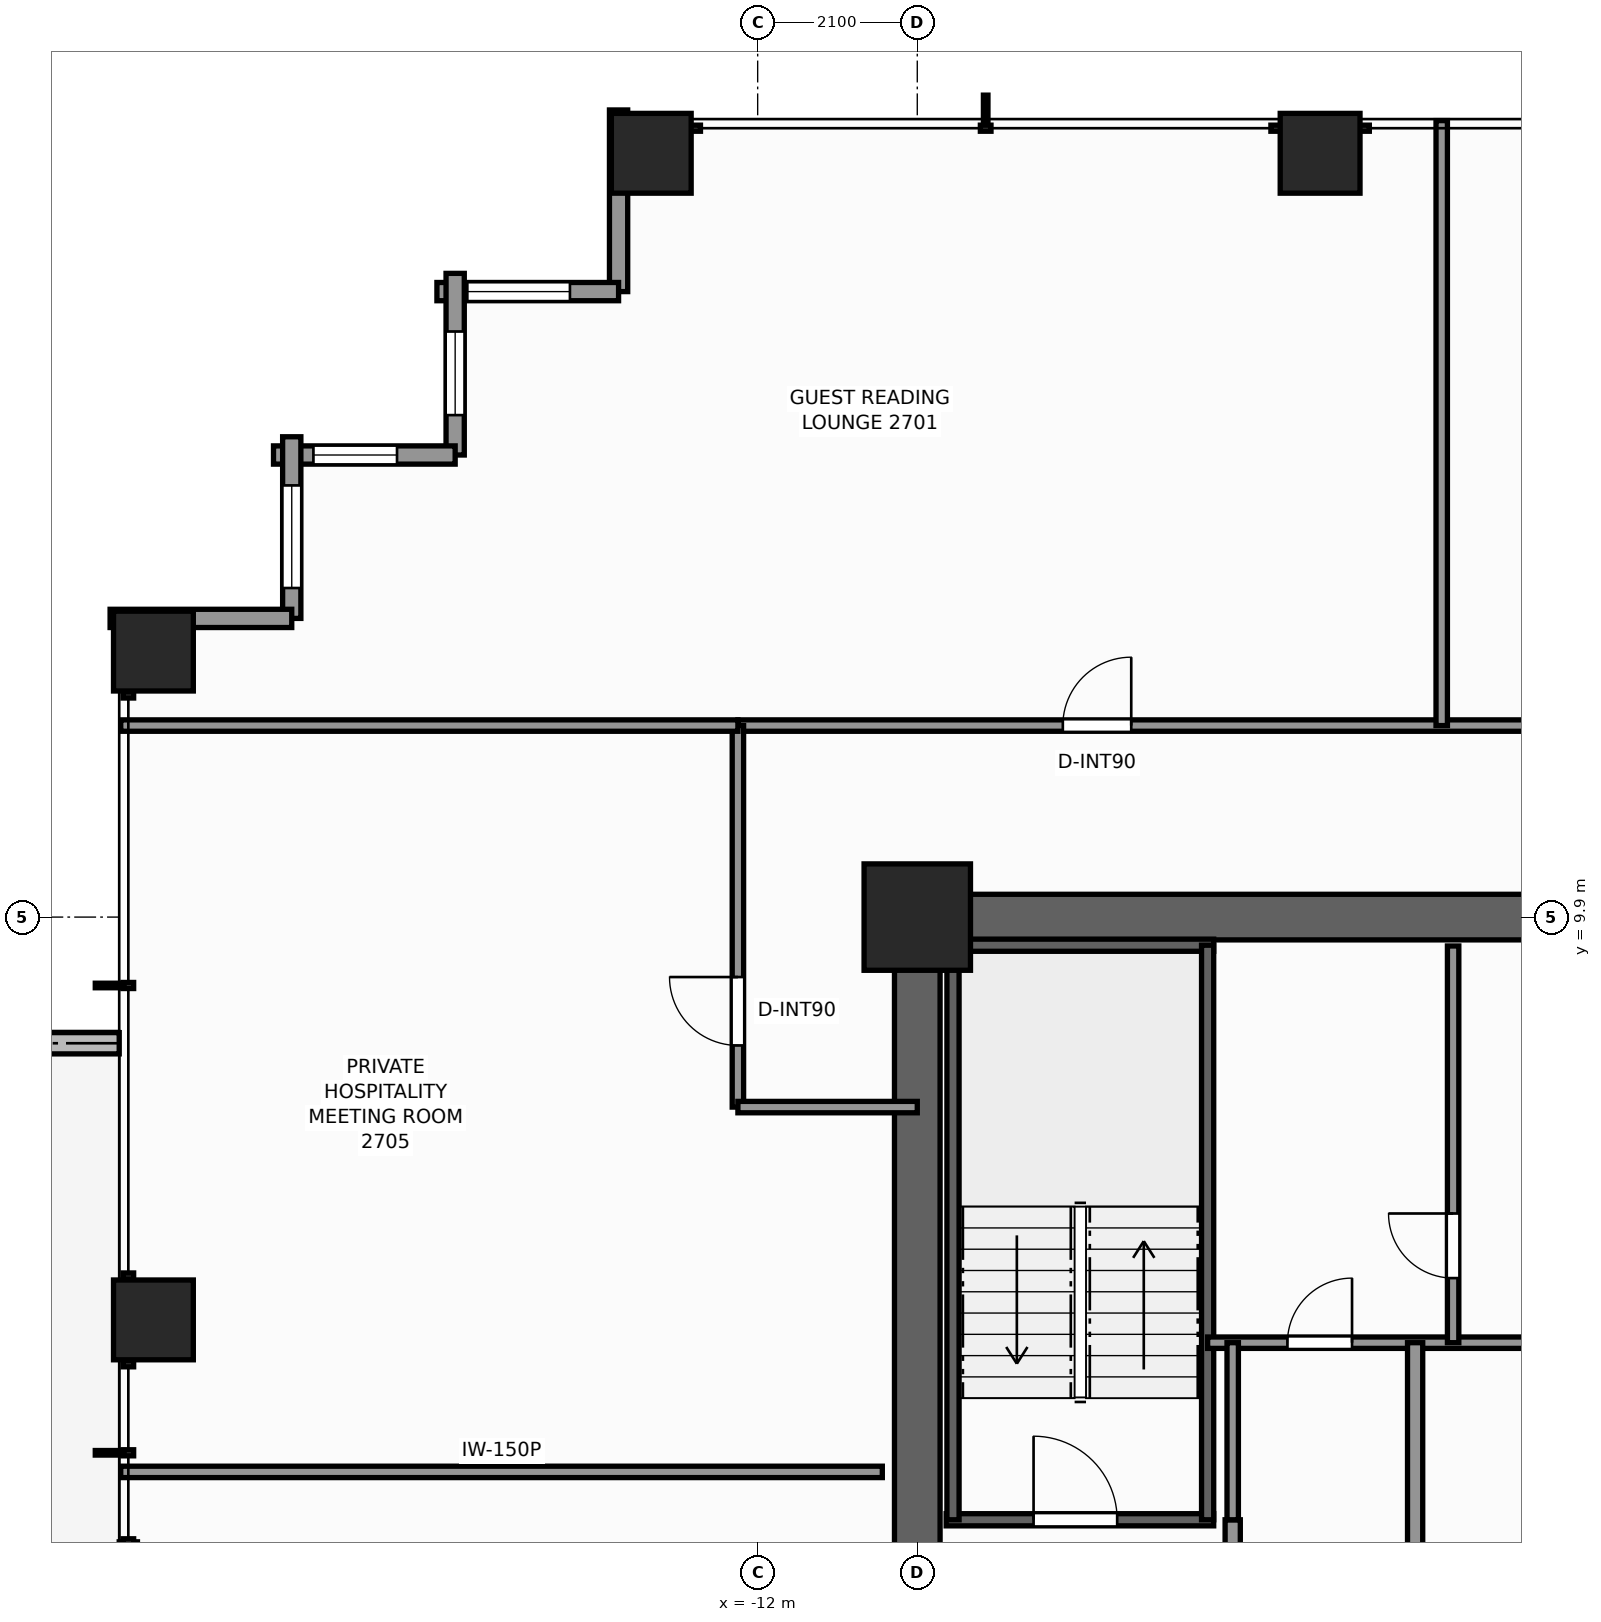
"""IFC4 building model, lengths in metres.
Left out: names, types, materials, properties, quantities, classifications, styles, units other than length and angle.
Written with IfcOpenShell. Run it as: python <this file> out.ifc"""

import sys

from ifc_helpers import new_model, si_unit, direction, frame, frame_2d, origin, origin_2d, place, context, subcontext, project, spatial, rectangle, extrude, element, fill, save


model = new_model("IFC4")
c1 = context("Model", 3, precision=1e-05, world=origin(), true_north=direction((0.0, 1.0)))
c2 = subcontext(c1, "Body", "Model", "MODEL_VIEW")
j1 = project(units=[si_unit("LENGTHUNIT", "METRE"), si_unit("PLANEANGLEUNIT", "RADIAN")], contexts=[c1])
p1 = place(None, origin())
s1 = spatial("IfcSite", under=j1, at=p1, CompositionType="ELEMENT")
p2 = place(p1, origin())
s2 = spatial("IfcBuilding", under=s1, at=p2, CompositionType="ELEMENT")
p3 = place(p2, frame((0.0, 0.0, 95.3)))
s3 = spatial("IfcBuildingStorey", under=s2, at=p3, CompositionType="ELEMENT", Elevation=95.3)
p4 = place(p3, frame((-10.2, 9.9, 0.0), z_axis=(0.0, 0.0, 1.0), x_axis=(1.0, 0.0, 0.0)))
e1 = element("IfcWall", 1, at=p4, inside=s3, PredefinedType="SHEAR", context=c2, shape_type="SweptSolid", body=[
    extrude(rectangle(XDim=14.62, YDim=0.6, at=frame_2d((7.31, 0.0))), origin(), (0.0, 0.0, 1.0), 3.3),
])
p5 = place(p3, frame((-9.9, -3.7, 0.0), z_axis=(0.0, 0.0, 1.0), x_axis=(0.0, 1.0, 0.0)))
e2 = element("IfcWall", 2, at=p5, inside=s3, PredefinedType="SHEAR", context=c2, shape_type="SweptSolid", body=[
    extrude(rectangle(XDim=13.3, YDim=0.6, at=frame_2d((6.65, 0.0))), origin(), (0.0, 0.0, 1.0), 3.3),
])
p6 = place(p5, frame((0.35, 0.0, 0.0)))
e3 = element("IfcOpeningElement", 3, at=p6, cuts=e2, PredefinedType="OPENING", context=c2, shape_type="SweptSolid", body=[
    extrude(rectangle(XDim=1.1, YDim=2.2, at=frame_2d((0.55, 1.1))), frame((0.0, 0.31, 0.0), z_axis=(0.0, -1.0, 0.0), x_axis=(1.0, 0.0, 0.0)), (0.0, 0.0, 1.0), 0.62),
])
p7 = place(p3, frame((-9.9, 9.9, 0.0), z_axis=(0.0, 0.0, 1.0), x_axis=(1.0, 0.0, 0.0)))
e4 = element("IfcColumn", 4, at=p7, inside=s3, PredefinedType="COLUMN", context=c2, shape_type="SweptSolid", body=[
    extrude(rectangle(XDim=1.4, YDim=1.4, at=origin_2d()), origin(), (0.0, 0.0, 1.0), 3.3),
])
for number, where, z_axis, x_axis in (
    (5, (-13.4, 19.95, 0.0), (0.0, 0.0, 1.0), (1.0, 0.0, 0.0)),
    (6, (-4.6, 19.95, 0.0), (0.0, 0.0, 1.0), (1.0, 0.0, 0.0)),
    (7, (-19.95, 4.6, 0.0), (0.0, 0.0, 1.0), (1.0, 0.0, 0.0)),
    (8, (-19.95, 13.4, 0.0), (0.0, 0.0, 1.0), (1.0, 0.0, 0.0)),
):
    element("IfcColumn", number, at=place(p3, frame(where, z_axis=z_axis, x_axis=x_axis)), inside=s3, PredefinedType="COLUMN", context=c2, shape_type="SweptSolid", body=[
        extrude(rectangle(XDim=1.05, YDim=1.05, at=origin_2d()), origin(), (0.0, 0.0, 1.0), 3.3),
    ])
p8 = place(p3, frame((-20.4, 8.24, -0.04), z_axis=(0.0, 0.0, 1.0), x_axis=(-1.0, 0.0, 0.0)))
e9 = element("IfcWall", 9, at=p8, inside=s3, PredefinedType="PARAPET", context=c2, shape_type="SweptSolid", body=[
    extrude(rectangle(XDim=2.006, YDim=0.28, at=frame_2d((1.003, 0.0))), origin(), (0.0, 0.0, 1.0), 0.42),
])
p9 = place(p3, frame((-13.83, 18.13, 0.0), z_axis=(0.0, 0.0, 1.0), x_axis=(0.0, 1.0, 0.0)))
e10 = element("IfcWall", 10, at=p9, inside=s3, PredefinedType="STANDARD", context=c2, shape_type="SweptSolid", body=[
    extrude(rectangle(XDim=2.39, YDim=0.24, at=frame_2d((1.195, 0.0))), origin(), (0.0, 0.0, 1.0), 2.459),
])
p10 = place(p3, frame((-16.22, 18.13, 0.0), z_axis=(0.0, 0.0, 1.0), x_axis=(1.0, 0.0, 0.0)))
e11 = element("IfcWall", 11, at=p10, inside=s3, PredefinedType="STANDARD", context=c2, shape_type="SweptSolid", body=[
    extrude(rectangle(XDim=2.39, YDim=0.24, at=frame_2d((1.195, 0.0))), origin(), (0.0, 0.0, 1.0), 2.459),
])
p11 = place(p10, frame((0.4, 0.0, 0.65)))
e12 = element("IfcOpeningElement", 12, at=p11, cuts=e11, PredefinedType="OPENING", context=c2, shape_type="SweptSolid", body=[
    extrude(rectangle(XDim=1.35, YDim=1.55, at=frame_2d((0.675, 0.775))), frame((0.0, 0.13, 0.0), z_axis=(0.0, -1.0, 0.0), x_axis=(1.0, 0.0, 0.0)), (0.0, 0.0, 1.0), 0.26),
])
p12 = place(p3, frame((-15.98, 15.98, 0.0), z_axis=(0.0, 0.0, 1.0), x_axis=(0.0, 1.0, 0.0)))
e13 = element("IfcWall", 13, at=p12, inside=s3, PredefinedType="STANDARD", context=c2, shape_type="SweptSolid", body=[
    extrude(rectangle(XDim=2.39, YDim=0.24, at=frame_2d((1.195, 0.0))), origin(), (0.0, 0.0, 1.0), 2.459),
])
p13 = place(p12, frame((0.525, 0.0, 0.65)))
e14 = element("IfcOpeningElement", 14, at=p13, cuts=e13, PredefinedType="OPENING", context=c2, shape_type="SweptSolid", body=[
    extrude(rectangle(XDim=1.1, YDim=1.45, at=frame_2d((0.55, 0.725))), frame((0.0, 0.13, 0.0), z_axis=(0.0, -1.0, 0.0), x_axis=(1.0, 0.0, 0.0)), (0.0, 0.0, 1.0), 0.26),
])
p14 = place(p3, frame((-18.37, 15.98, 0.0), z_axis=(0.0, 0.0, 1.0), x_axis=(1.0, 0.0, 0.0)))
e15 = element("IfcWall", 15, at=p14, inside=s3, PredefinedType="STANDARD", context=c2, shape_type="SweptSolid", body=[
    extrude(rectangle(XDim=2.39, YDim=0.24, at=frame_2d((1.195, 0.0))), origin(), (0.0, 0.0, 1.0), 2.459),
])
p15 = place(p14, frame((0.525, 0.0, 0.65)))
e16 = element("IfcOpeningElement", 16, at=p15, cuts=e15, PredefinedType="OPENING", context=c2, shape_type="SweptSolid", body=[
    extrude(rectangle(XDim=1.1, YDim=1.45, at=frame_2d((0.55, 0.725))), frame((0.0, 0.13, 0.0), z_axis=(0.0, -1.0, 0.0), x_axis=(1.0, 0.0, 0.0)), (0.0, 0.0, 1.0), 0.26),
])
p16 = place(p3, frame((-18.13, 13.83, 0.0), z_axis=(0.0, 0.0, 1.0), x_axis=(0.0, 1.0, 0.0)))
e17 = element("IfcWall", 17, at=p16, inside=s3, PredefinedType="STANDARD", context=c2, shape_type="SweptSolid", body=[
    extrude(rectangle(XDim=2.39, YDim=0.24, at=frame_2d((1.195, 0.0))), origin(), (0.0, 0.0, 1.0), 2.459),
])
p17 = place(p16, frame((0.4, 0.0, 0.65)))
e18 = element("IfcOpeningElement", 18, at=p17, cuts=e17, PredefinedType="OPENING", context=c2, shape_type="SweptSolid", body=[
    extrude(rectangle(XDim=1.35, YDim=1.55, at=frame_2d((0.675, 0.775))), frame((0.0, 0.13, 0.0), z_axis=(0.0, -1.0, 0.0), x_axis=(1.0, 0.0, 0.0)), (0.0, 0.0, 1.0), 0.26),
])
p18 = place(p3, frame((-20.52, 13.83, 0.0), z_axis=(0.0, 0.0, 1.0), x_axis=(1.0, 0.0, 0.0)))
e19 = element("IfcWall", 19, at=p18, inside=s3, PredefinedType="STANDARD", context=c2, shape_type="SweptSolid", body=[
    extrude(rectangle(XDim=2.39, YDim=0.24, at=frame_2d((1.195, 0.0))), origin(), (0.0, 0.0, 1.0), 2.459),
])
p19 = place(p3, frame((-9.52, 1.97, 0.0), z_axis=(0.0, 0.0, 1.0), x_axis=(1.0, 0.0, 0.0)))
e20 = element("IfcWall", 20, at=p19, inside=s3, PredefinedType="SHEAR", context=c2, shape_type="SweptSolid", body=[
    extrude(rectangle(XDim=3.52, YDim=0.16, at=frame_2d((1.76, 0.0))), origin(), (0.0, 0.0, 1.0), 3.3),
])
p20 = place(p19, frame((1.15, 0.0, 0.0)))
e21 = element("IfcOpeningElement", 21, at=p20, cuts=e20, PredefinedType="OPENING", context=c2, shape_type="SweptSolid", body=[
    extrude(rectangle(XDim=1.1, YDim=2.2, at=frame_2d((0.55, 1.1))), frame((0.0, 0.09, 0.0), z_axis=(0.0, -1.0, 0.0), x_axis=(1.0, 0.0, 0.0)), (0.0, 0.0, 1.0), 0.18),
])
p21 = place(p3, frame((-9.52, 9.53, 0.0), z_axis=(0.0, 0.0, 1.0), x_axis=(1.0, 0.0, 0.0)))
e22 = element("IfcWall", 22, at=p21, inside=s3, PredefinedType="SHEAR", context=c2, shape_type="SweptSolid", body=[
    extrude(rectangle(XDim=3.52, YDim=0.16, at=frame_2d((1.76, 0.0))), origin(), (0.0, 0.0, 1.0), 3.3),
])
for number, where, z_axis, x_axis in (
    (23, (-9.43, 1.97, 0.0), (0.0, 0.0, 1.0), (0.0, 1.0, 0.0)),
    (24, (-6.08, 1.97, 0.0), (0.0, 0.0, 1.0), (0.0, 1.0, 0.0)),
):
    element("IfcWall", number, at=place(p3, frame(where, z_axis=z_axis, x_axis=x_axis)), inside=s3, PredefinedType="SHEAR", context=c2, shape_type="SweptSolid", body=[
        extrude(rectangle(XDim=7.56, YDim=0.16, at=frame_2d((3.78, 0.0))), origin(), (0.0, 0.0, 1.0), 3.3),
    ])
p22 = place(p3, frame((-5.75, -3.6, 0.0), z_axis=(0.0, 0.0, 1.0), x_axis=(0.0, 1.0, 0.0)))
e25 = element("IfcWall", 25, at=p22, inside=s3, PredefinedType="SOLIDWALL", context=c2, shape_type="SweptSolid", body=[
    extrude(rectangle(XDim=5.57, YDim=0.2, at=frame_2d((2.785, 0.0))), origin(), (0.0, 0.0, 1.0), 3.08),
])
p23 = place(p22, frame((2.75, 0.0, 0.0)))
e26 = element("IfcOpeningElement", 26, at=p23, cuts=e25, PredefinedType="OPENING", context=c2, shape_type="SweptSolid", body=[
    extrude(rectangle(XDim=1.1, YDim=2.2, at=frame_2d((0.55, 1.1))), frame((0.0, 0.11, 0.0), z_axis=(0.0, -1.0, 0.0), x_axis=(1.0, 0.0, 0.0)), (0.0, 0.0, 1.0), 0.22),
])
p24 = place(p3, frame((-6.08, 4.3, 0.0), z_axis=(0.0, 0.0, 1.0), x_axis=(1.0, 0.0, 0.0)))
e27 = element("IfcWall", 27, at=p24, inside=s3, PredefinedType="PARTITIONING", context=c2, shape_type="SweptSolid", body=[
    extrude(rectangle(XDim=6.3, YDim=0.15, at=frame_2d((3.15, 0.0))), origin(), (0.0, 0.0, 1.0), 3.08),
])
p25 = place(p24, frame((1.05, 0.0, 0.0)))
e28 = element("IfcOpeningElement", 28, at=p25, cuts=e27, PredefinedType="OPENING", context=c2, shape_type="SweptSolid", body=[
    extrude(rectangle(XDim=0.85, YDim=2.03, at=frame_2d((0.425, 1.015))), frame((0.0, 0.085, 0.0), z_axis=(0.0, -1.0, 0.0), x_axis=(1.0, 0.0, 0.0)), (0.0, 0.0, 1.0), 0.17),
])
p26 = place(p3, frame((-2.85, 4.3, 0.0), z_axis=(0.0, 0.0, 1.0), x_axis=(0.0, 1.0, 0.0)))
e29 = element("IfcWall", 29, at=p26, inside=s3, PredefinedType="PARTITIONING", context=c2, shape_type="SweptSolid", body=[
    extrude(rectangle(XDim=5.22, YDim=0.15, at=frame_2d((2.61, 0.0))), origin(), (0.0, 0.0, 1.0), 3.08),
])
p27 = place(p26, frame((0.85, 0.0, 0.0)))
e30 = element("IfcOpeningElement", 30, at=p27, cuts=e29, PredefinedType="OPENING", context=c2, shape_type="SweptSolid", body=[
    extrude(rectangle(XDim=0.85, YDim=2.03, at=frame_2d((0.425, 1.015))), frame((0.0, 0.085, 0.0), z_axis=(0.0, -1.0, 0.0), x_axis=(1.0, 0.0, 0.0)), (0.0, 0.0, 1.0), 0.17),
])
p28 = place(p3, frame((-3.35, 1.1, 0.0), z_axis=(0.0, 0.0, 1.0), x_axis=(0.0, 1.0, 0.0)))
e31 = element("IfcWall", 31, at=p28, inside=s3, PredefinedType="SOLIDWALL", context=c2, shape_type="SweptSolid", body=[
    extrude(rectangle(XDim=3.2, YDim=0.2, at=frame_2d((1.6, 0.0))), origin(), (0.0, 0.0, 1.0), 3.08),
])
p29 = place(p3, frame((-5.75, 1.97, 0.0), z_axis=(0.0, 0.0, 1.0), x_axis=(0.0, 1.0, 0.0)))
e32 = element("IfcWall", 32, at=p29, inside=s3, PredefinedType="PARTITIONING", context=c2, shape_type="SweptSolid", body=[
    extrude(rectangle(XDim=2.33, YDim=0.15, at=frame_2d((1.165, 0.0))), origin(), (0.0, 0.0, 1.0), 3.08),
])
p30 = place(p3, frame((-12.26, 12.42, 0.0), z_axis=(0.0, 0.0, 1.0), x_axis=(1.0, 0.0, 0.0)))
e33 = element("IfcWall", 33, at=p30, inside=s3, PredefinedType="PARTITIONING", context=c2, shape_type="SweptSolid", body=[
    extrude(rectangle(XDim=24.68, YDim=0.15, at=frame_2d((12.34, 0.0))), origin(), (0.0, 0.0, 1.0), 2.292),
])
p31 = place(p30, frame((4.275, 0.0, 0.0)))
e34 = element("IfcOpeningElement", 34, at=p31, cuts=e33, PredefinedType="OPENING", context=c2, shape_type="SweptSolid", body=[
    extrude(rectangle(XDim=0.9, YDim=2.06, at=frame_2d((0.45, 1.03))), frame((0.0, 0.085, 0.0), z_axis=(0.0, -1.0, 0.0), x_axis=(1.0, 0.0, 0.0)), (0.0, 0.0, 1.0), 0.17),
])
p32 = place(p30, frame((19.345, 0.0, 0.0)))
e35 = element("IfcOpeningElement", 35, at=p32, cuts=e33, PredefinedType="OPENING", context=c2, shape_type="SweptSolid", body=[
    extrude(rectangle(XDim=0.9, YDim=2.06, at=frame_2d((0.45, 1.03))), frame((0.0, 0.085, 0.0), z_axis=(0.0, -1.0, 0.0), x_axis=(1.0, 0.0, 0.0)), (0.0, 0.0, 1.0), 0.17),
])
p33 = place(p3, frame((-12.26, 7.4, 0.0), z_axis=(0.0, 0.0, 1.0), x_axis=(0.0, 1.0, 0.0)))
e36 = element("IfcWall", 36, at=p33, inside=s3, PredefinedType="PARTITIONING", context=c2, shape_type="SweptSolid", body=[
    extrude(rectangle(XDim=5.02, YDim=0.15, at=frame_2d((2.51, 0.0))), origin(), (0.0, 0.0, 1.0), 2.292),
])
p34 = place(p33, frame((0.811, 0.0, 0.0)))
e37 = element("IfcOpeningElement", 37, at=p34, cuts=e36, PredefinedType="OPENING", context=c2, shape_type="SweptSolid", body=[
    extrude(rectangle(XDim=0.9, YDim=2.06, at=frame_2d((0.45, 1.03))), frame((0.0, 0.085, 0.0), z_axis=(0.0, -1.0, 0.0), x_axis=(1.0, 0.0, 0.0)), (0.0, 0.0, 1.0), 0.17),
])
p35 = place(p3, frame((-12.26, 7.4, 0.0), z_axis=(0.0, 0.0, 1.0), x_axis=(1.0, 0.0, 0.0)))
e38 = element("IfcWall", 38, at=p35, inside=s3, PredefinedType="PARTITIONING", context=c2, shape_type="SweptSolid", body=[
    extrude(rectangle(XDim=2.36, YDim=0.15, at=frame_2d((1.18, 0.0))), origin(), (0.0, 0.0, 1.0), 3.08),
])
p36 = place(p3, frame((-20.38, 12.42, 0.0), z_axis=(0.0, 0.0, 1.0), x_axis=(1.0, 0.0, 0.0)))
e39 = element("IfcWall", 39, at=p36, inside=s3, PredefinedType="PARTITIONING", context=c2, shape_type="SweptSolid", body=[
    extrude(rectangle(XDim=8.12, YDim=0.15, at=frame_2d((4.06, 0.0))), origin(), (0.0, 0.0, 1.0), 2.292),
])
p37 = place(p3, frame((-3.0, 12.42, 0.0), z_axis=(0.0, 0.0, 1.0), x_axis=(0.0, 1.0, 0.0)))
e40 = element("IfcWall", 40, at=p37, inside=s3, PredefinedType="PARTITIONING", context=c2, shape_type="SweptSolid", body=[
    extrude(rectangle(XDim=7.96, YDim=0.15, at=frame_2d((3.98, 0.0))), origin(), (0.0, 0.0, 1.0), 2.369),
])
p38 = place(p3, frame((-20.38, 2.6, 0.0), z_axis=(0.0, 0.0, 1.0), x_axis=(1.0, 0.0, 0.0)))
e41 = element("IfcWall", 41, at=p38, inside=s3, PredefinedType="PARTITIONING", context=c2, shape_type="SweptSolid", body=[
    extrude(rectangle(XDim=10.02, YDim=0.15, at=frame_2d((5.01, 0.0))), origin(), (0.0, 0.0, 1.0), 2.449),
])
p39 = place(p11, origin())
e42 = element("IfcWindow", 42, at=p39, inside=s3, PartitioningType="SINGLE_PANEL", PredefinedType="WINDOW", context=c2, shape_type="SweptSolid", body=[
    extrude(rectangle(XDim=1.35, YDim=1.55, at=frame_2d((0.675, 0.775))), frame((0.0, 0.03, 0.0), z_axis=(0.0, -1.0, 0.0), x_axis=(1.0, 0.0, 0.0)), (0.0, 0.0, 1.0), 0.06),
])
fill(e12, e42)
p40 = place(p13, origin())
e43 = element("IfcWindow", 43, at=p40, inside=s3, PartitioningType="SINGLE_PANEL", PredefinedType="WINDOW", context=c2, shape_type="SweptSolid", body=[
    extrude(rectangle(XDim=1.1, YDim=1.45, at=frame_2d((0.55, 0.725))), frame((0.0, 0.03, 0.0), z_axis=(0.0, -1.0, 0.0), x_axis=(1.0, 0.0, 0.0)), (0.0, 0.0, 1.0), 0.06),
])
fill(e14, e43)
p41 = place(p15, origin())
e44 = element("IfcWindow", 44, at=p41, inside=s3, PartitioningType="SINGLE_PANEL", PredefinedType="WINDOW", context=c2, shape_type="SweptSolid", body=[
    extrude(rectangle(XDim=1.1, YDim=1.45, at=frame_2d((0.55, 0.725))), frame((0.0, 0.03, 0.0), z_axis=(0.0, -1.0, 0.0), x_axis=(1.0, 0.0, 0.0)), (0.0, 0.0, 1.0), 0.06),
])
fill(e16, e44)
p42 = place(p17, origin())
e45 = element("IfcWindow", 45, at=p42, inside=s3, PartitioningType="SINGLE_PANEL", PredefinedType="WINDOW", context=c2, shape_type="SweptSolid", body=[
    extrude(rectangle(XDim=1.35, YDim=1.55, at=frame_2d((0.675, 0.775))), frame((0.0, 0.03, 0.0), z_axis=(0.0, -1.0, 0.0), x_axis=(1.0, 0.0, 0.0)), (0.0, 0.0, 1.0), 0.06),
])
fill(e18, e45)
p43 = place(p20, origin())
e46 = element("IfcDoor", 46, at=p43, inside=s3, OperationType="SINGLE_SWING_LEFT", PredefinedType="DOOR", context=c2, shape_type="SweptSolid", body=[
    extrude(rectangle(XDim=1.1, YDim=2.2, at=frame_2d((0.55, 1.1))), frame((0.0, 0.025, 0.0), z_axis=(0.0, -1.0, 0.0), x_axis=(1.0, 0.0, 0.0)), (0.0, 0.0, 1.0), 0.05),
])
fill(e21, e46)
p44 = place(p27, origin())
e47 = element("IfcDoor", 47, at=p44, inside=s3, OperationType="SINGLE_SWING_RIGHT", PredefinedType="DOOR", context=c2, shape_type="SweptSolid", body=[
    extrude(rectangle(XDim=0.85, YDim=2.03, at=frame_2d((0.425, 1.015))), frame((0.0, 0.025, 0.0), z_axis=(0.0, -1.0, 0.0), x_axis=(1.0, 0.0, 0.0)), (0.0, 0.0, 1.0), 0.05),
])
fill(e30, e47)
p45 = place(p25, origin())
e48 = element("IfcDoor", 48, at=p45, inside=s3, OperationType="SINGLE_SWING_RIGHT", PredefinedType="DOOR", context=c2, shape_type="SweptSolid", body=[
    extrude(rectangle(XDim=0.85, YDim=2.03, at=frame_2d((0.425, 1.015))), frame((0.0, 0.025, 0.0), z_axis=(0.0, -1.0, 0.0), x_axis=(1.0, 0.0, 0.0)), (0.0, 0.0, 1.0), 0.05),
])
fill(e28, e48)
p46 = place(p31, origin())
e49 = element("IfcDoor", 49, at=p46, inside=s3, OperationType="SINGLE_SWING_RIGHT", PredefinedType="DOOR", context=c2, shape_type="SweptSolid", body=[
    extrude(rectangle(XDim=0.9, YDim=2.06, at=frame_2d((0.45, 1.03))), frame((0.0, 0.025, 0.0), z_axis=(0.0, -1.0, 0.0), x_axis=(1.0, 0.0, 0.0)), (0.0, 0.0, 1.0), 0.05),
])
fill(e34, e49)
p47 = place(p34, origin())
e50 = element("IfcDoor", 50, at=p47, inside=s3, OperationType="SINGLE_SWING_RIGHT", PredefinedType="DOOR", context=c2, shape_type="SweptSolid", body=[
    extrude(rectangle(XDim=0.9, YDim=2.06, at=frame_2d((0.45, 1.03))), frame((0.0, 0.025, 0.0), z_axis=(0.0, -1.0, 0.0), x_axis=(1.0, 0.0, 0.0)), (0.0, 0.0, 1.0), 0.05),
])
fill(e37, e50)
save(model, sys.argv[1])
